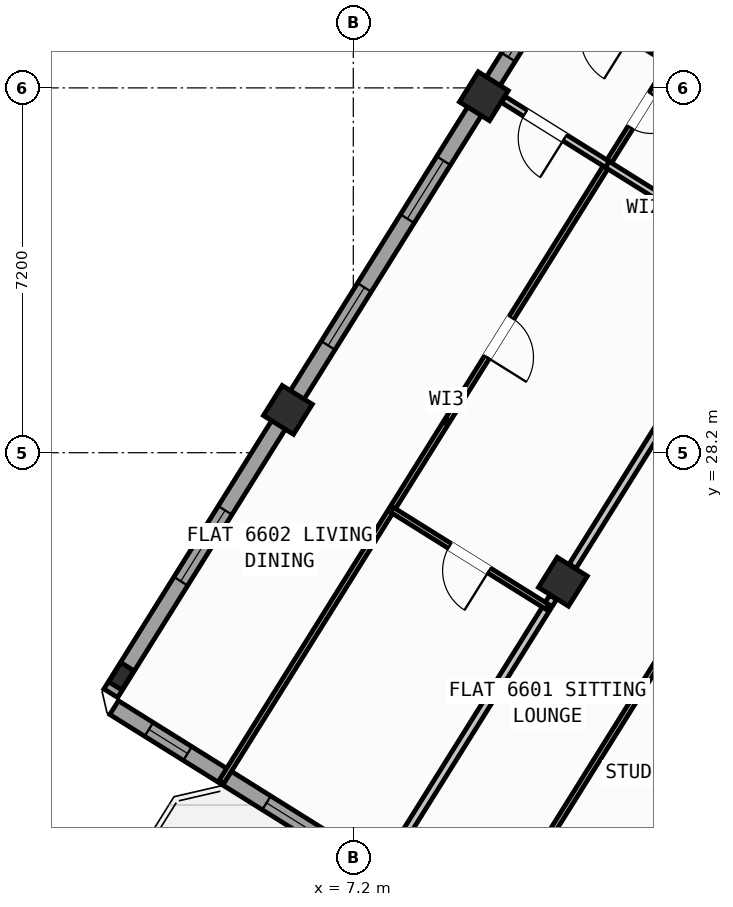
"""IFC4 building model, lengths in metres.
Left out: names, types, materials, properties, quantities, classifications, styles, units other than length and angle.
Written with IfcOpenShell. Run it as: python <this file> out.ifc"""

import sys

from ifc_helpers import new_model, si_unit, direction, frame, frame_2d, origin, origin_2d, place, context, subcontext, project, spatial, rectangle, hollow_rectangle, i_section, extrude, source, transform, mapped, element, fill, save


model = new_model("IFC4")
c1 = context("Model", 3, precision=1e-05, world=origin(), true_north=direction((0.0, 1.0)))
c2 = subcontext(c1, "Body", "Model", "MODEL_VIEW")
j1 = project(units=[si_unit("LENGTHUNIT", "METRE"), si_unit("PLANEANGLEUNIT", "RADIAN")], contexts=[c1])
p1 = place(None, origin())
s1 = spatial("IfcSite", under=j1, at=p1, CompositionType="ELEMENT")
p2 = place(p1, origin())
s2 = spatial("IfcBuilding", under=s1, at=p2, CompositionType="ELEMENT")
p3 = place(p2, frame((0.0, 0.0, 262.8)))
s3 = spatial("IfcBuildingStorey", under=s2, at=p3, CompositionType="ELEMENT", Elevation=262.8)
m1 = source(origin(), c2, "Body", "SweptSolid", [
    extrude(hollow_rectangle(XDim=0.7, YDim=0.7, WallThickness=0.028, at=origin_2d()), origin(), (0.0, 0.0, 1.0), 3.6),
])
for number, where, z_axis, x_axis in (
    (1, (11.336, 25.653, 0.0), (0.0, 0.0, 1.0), (-0.848, 0.53, 0.0)),
    (2, (9.777, 35.235, 0.0), (0.0, 0.0, 1.0), (-0.848, 0.53, 0.0)),
    (3, (5.909, 29.044, 0.0), (0.0, 0.0, 1.0), (-0.848, 0.53, 0.0)),
):
    element("IfcColumn", number, at=place(p3, frame(where, z_axis=z_axis, x_axis=x_axis)), inside=s3, PredefinedType="COLUMN", context=c2, shape_type="MappedRepresentation", body=[
        mapped(m1, transform((0.0, 0.0, 0.0), scale=1.0)),
    ])
m2 = source(origin(), c2, "Body", "SweptSolid", [
    extrude(i_section(OverallWidth=0.3, OverallDepth=0.45, WebThickness=0.014, FlangeThickness=0.026, at=origin_2d()), origin(), (0.0, 0.0, 1.0), 3.6),
])
p4 = place(p3, frame((2.623, 23.786, 0.0), z_axis=(0.0, 0.0, 1.0), x_axis=(-0.848048096156, 0.529919264233, 0.0)))
e4 = element("IfcColumn", 4, at=p4, inside=s3, PredefinedType="COLUMN", context=c2, shape_type="MappedRepresentation", body=[
    mapped(m2, transform((0.0, 0.0, 0.0), scale=1.0)),
])
p5 = place(p3, frame((29.268, 6.429, 0.0), z_axis=(0.0, 0.0, 1.0), x_axis=(-0.848049971435, 0.529916263149, 0.0)))
e5 = element("IfcWall", 5, at=p5, inside=s3, PredefinedType="STANDARD", context=c2, shape_type="SweptSolid", body=[
    extrude(rectangle(XDim=31.588, YDim=0.32, at=frame_2d((15.794, 0.0))), origin(), (0.0, 0.0, 1.0), 3.35),
])
p6 = place(p5, frame((16.362, 0.0, 0.0)))
e6 = element("IfcOpeningElement", 6, at=p6, cuts=e5, PredefinedType="OPENING", context=c2, shape_type="SweptSolid", body=[
    extrude(rectangle(XDim=1.2, YDim=2.15, at=frame_2d((0.6, 1.075))), frame((0.0, 0.17, 0.0), z_axis=(0.0, -1.0, 0.0), x_axis=(1.0, 0.0, 0.0)), (0.0, 0.0, 1.0), 0.34),
])
p7 = place(p5, frame((3.859, 0.0, 0.9)))
e7 = element("IfcOpeningElement", 7, at=p7, cuts=e5, PredefinedType="OPENING", context=c2, shape_type="SweptSolid", body=[
    extrude(rectangle(XDim=1.65, YDim=1.45, at=frame_2d((0.825, 0.725))), frame((0.0, 0.17, 0.0), z_axis=(0.0, -1.0, 0.0), x_axis=(1.0, 0.0, 0.0)), (0.0, 0.0, 1.0), 0.34),
])
p8 = place(p5, frame((10.519, 0.0, 0.9)))
e8 = element("IfcOpeningElement", 8, at=p8, cuts=e5, PredefinedType="OPENING", context=c2, shape_type="SweptSolid", body=[
    extrude(rectangle(XDim=1.65, YDim=1.45, at=frame_2d((0.825, 0.725))), frame((0.0, 0.17, 0.0), z_axis=(0.0, -1.0, 0.0), x_axis=(1.0, 0.0, 0.0)), (0.0, 0.0, 1.0), 0.34),
])
p9 = place(p5, frame((20.015, 0.0, 0.95)))
e9 = element("IfcOpeningElement", 9, at=p9, cuts=e5, PredefinedType="OPENING", context=c2, shape_type="SweptSolid", body=[
    extrude(rectangle(XDim=1.95, YDim=1.35, at=frame_2d((0.975, 0.675))), frame((0.0, 0.17, 0.0), z_axis=(0.0, -1.0, 0.0), x_axis=(1.0, 0.0, 0.0)), (0.0, 0.0, 1.0), 0.34),
])
p10 = place(p5, frame((23.715, 0.0, 1.0)))
e10 = element("IfcOpeningElement", 10, at=p10, cuts=e5, PredefinedType="OPENING", context=c2, shape_type="SweptSolid", body=[
    extrude(rectangle(XDim=0.9, YDim=1.25, at=frame_2d((0.45, 0.625))), frame((0.0, 0.17, 0.0), z_axis=(0.0, -1.0, 0.0), x_axis=(1.0, 0.0, 0.0)), (0.0, 0.0, 1.0), 0.34),
])
p11 = place(p5, frame((26.391, 0.0, 0.9)))
e11 = element("IfcOpeningElement", 11, at=p11, cuts=e5, PredefinedType="OPENING", context=c2, shape_type="SweptSolid", body=[
    extrude(rectangle(XDim=1.65, YDim=1.45, at=frame_2d((0.825, 0.725))), frame((0.0, 0.17, 0.0), z_axis=(0.0, -1.0, 0.0), x_axis=(1.0, 0.0, 0.0)), (0.0, 0.0, 1.0), 0.34),
])
p12 = place(p5, frame((29.878, 0.0, 1.0)))
e12 = element("IfcOpeningElement", 12, at=p12, cuts=e5, PredefinedType="OPENING", context=c2, shape_type="SweptSolid", body=[
    extrude(rectangle(XDim=0.9, YDim=1.25, at=frame_2d((0.45, 0.625))), frame((0.0, 0.17, 0.0), z_axis=(0.0, -1.0, 0.0), x_axis=(1.0, 0.0, 0.0)), (0.0, 0.0, 1.0), 0.34),
])
p13 = place(p3, frame((2.415, 23.452, 0.0), z_axis=(0.0, 0.0, 1.0), x_axis=(0.52991049553, 0.848053575387, 0.0)))
e13 = element("IfcWall", 13, at=p13, inside=s3, PredefinedType="STANDARD", context=c2, shape_type="SweptSolid", body=[
    extrude(rectangle(XDim=21.587, YDim=0.32, at=frame_2d((10.794, 0.0))), origin(), (0.0, 0.0, 1.0), 2.875),
])
p14 = place(p13, frame((2.606, 0.0, 0.9)))
e14 = element("IfcOpeningElement", 14, at=p14, cuts=e13, PredefinedType="OPENING", context=c2, shape_type="SweptSolid", body=[
    extrude(rectangle(XDim=1.65, YDim=1.45, at=frame_2d((0.825, 0.725))), frame((0.0, 0.17, 0.0), z_axis=(0.0, -1.0, 0.0), x_axis=(1.0, 0.0, 0.0)), (0.0, 0.0, 1.0), 0.34),
])
p15 = place(p13, frame((8.094, 0.0, 0.9)))
e15 = element("IfcOpeningElement", 15, at=p15, cuts=e13, PredefinedType="OPENING", context=c2, shape_type="SweptSolid", body=[
    extrude(rectangle(XDim=1.35, YDim=1.45, at=frame_2d((0.675, 0.725))), frame((0.0, 0.17, 0.0), z_axis=(0.0, -1.0, 0.0), x_axis=(1.0, 0.0, 0.0)), (0.0, 0.0, 1.0), 0.34),
])
p16 = place(p13, frame((11.044, 0.0, 0.9)))
e16 = element("IfcOpeningElement", 16, at=p16, cuts=e13, PredefinedType="OPENING", context=c2, shape_type="SweptSolid", body=[
    extrude(rectangle(XDim=1.35, YDim=1.45, at=frame_2d((0.675, 0.725))), frame((0.0, 0.17, 0.0), z_axis=(0.0, -1.0, 0.0), x_axis=(1.0, 0.0, 0.0)), (0.0, 0.0, 1.0), 0.34),
])
p17 = place(p13, frame((14.804, 0.0, 1.0)))
e17 = element("IfcOpeningElement", 17, at=p17, cuts=e13, PredefinedType="OPENING", context=c2, shape_type="SweptSolid", body=[
    extrude(rectangle(XDim=0.9, YDim=1.25, at=frame_2d((0.45, 0.625))), frame((0.0, 0.17, 0.0), z_axis=(0.0, -1.0, 0.0), x_axis=(1.0, 0.0, 0.0)), (0.0, 0.0, 1.0), 0.34),
])
p18 = place(p13, frame((19.384, 0.0, 1.0)))
e18 = element("IfcOpeningElement", 18, at=p18, cuts=e13, PredefinedType="OPENING", context=c2, shape_type="SweptSolid", body=[
    extrude(rectangle(XDim=0.9, YDim=1.25, at=frame_2d((0.45, 0.625))), frame((0.0, 0.17, 0.0), z_axis=(0.0, -1.0, 0.0), x_axis=(1.0, 0.0, 0.0)), (0.0, 0.0, 1.0), 0.34),
])
p19 = place(p3, frame((26.363, 30.472, 0.0), z_axis=(0.0, 0.0, 1.0), x_axis=(-0.848052408131, 0.529912363569, 0.0)))
e19 = element("IfcWall", 19, at=p19, inside=s3, PredefinedType="PARTITIONING", context=c2, shape_type="SweptSolid", body=[
    extrude(rectangle(XDim=16.73, YDim=0.16, at=frame_2d((8.365, 0.0))), origin(), (0.0, 0.0, 1.0), 3.34),
])
p20 = place(p19, frame((1.588, 0.0, 0.0)))
e20 = element("IfcOpeningElement", 20, at=p20, cuts=e19, PredefinedType="OPENING", context=c2, shape_type="SweptSolid", body=[
    extrude(rectangle(XDim=1.0, YDim=2.1, at=frame_2d((0.5, 1.05))), frame((0.0, 0.09, 0.0), z_axis=(0.0, -1.0, 0.0), x_axis=(1.0, 0.0, 0.0)), (0.0, 0.0, 1.0), 0.18),
])
p21 = place(p19, frame((6.685, 0.0, 0.0)))
e21 = element("IfcOpeningElement", 21, at=p21, cuts=e19, PredefinedType="OPENING", context=c2, shape_type="SweptSolid", body=[
    extrude(rectangle(XDim=1.0, YDim=2.1, at=frame_2d((0.5, 1.05))), frame((0.0, 0.09, 0.0), z_axis=(0.0, -1.0, 0.0), x_axis=(1.0, 0.0, 0.0)), (0.0, 0.0, 1.0), 0.18),
])
p22 = place(p19, frame((12.951, 0.0, 0.0)))
e22 = element("IfcOpeningElement", 22, at=p22, cuts=e19, PredefinedType="OPENING", context=c2, shape_type="SweptSolid", body=[
    extrude(rectangle(XDim=1.0, YDim=2.1, at=frame_2d((0.5, 1.05))), frame((0.0, 0.09, 0.0), z_axis=(0.0, -1.0, 0.0), x_axis=(1.0, 0.0, 0.0)), (0.0, 0.0, 1.0), 0.18),
])
p23 = place(p3, frame((25.198, 28.606, 0.0), z_axis=(0.0, 0.0, 1.0), x_axis=(-0.848052408131, 0.529912363569, 0.0)))
e23 = element("IfcWall", 23, at=p23, inside=s3, PredefinedType="PARTITIONING", context=c2, shape_type="SweptSolid", body=[
    extrude(rectangle(XDim=16.73, YDim=0.16, at=frame_2d((8.365, 0.0))), origin(), (0.0, 0.0, 1.0), 3.34),
])
p24 = place(p23, frame((1.395, 0.0, 0.0)))
e24 = element("IfcOpeningElement", 24, at=p24, cuts=e23, PredefinedType="OPENING", context=c2, shape_type="SweptSolid", body=[
    extrude(rectangle(XDim=1.0, YDim=2.1, at=frame_2d((0.5, 1.05))), frame((0.0, 0.09, 0.0), z_axis=(0.0, -1.0, 0.0), x_axis=(1.0, 0.0, 0.0)), (0.0, 0.0, 1.0), 0.18),
])
p25 = place(p23, frame((7.82, 0.0, 0.0)))
e25 = element("IfcOpeningElement", 25, at=p25, cuts=e23, PredefinedType="OPENING", context=c2, shape_type="SweptSolid", body=[
    extrude(rectangle(XDim=1.0, YDim=2.1, at=frame_2d((0.5, 1.05))), frame((0.0, 0.09, 0.0), z_axis=(0.0, -1.0, 0.0), x_axis=(1.0, 0.0, 0.0)), (0.0, 0.0, 1.0), 0.18),
])
p26 = place(p23, frame((14.76, 0.0, 0.0)))
e26 = element("IfcOpeningElement", 26, at=p26, cuts=e23, PredefinedType="OPENING", context=c2, shape_type="SweptSolid", body=[
    extrude(rectangle(XDim=1.0, YDim=2.1, at=frame_2d((0.5, 1.05))), frame((0.0, 0.09, 0.0), z_axis=(0.0, -1.0, 0.0), x_axis=(1.0, 0.0, 0.0)), (0.0, 0.0, 1.0), 0.18),
])
p27 = place(p3, frame((15.013, 31.537, 0.0), z_axis=(0.0, 0.0, 1.0), x_axis=(-0.529922185033, -0.848046271031, 0.0)))
e27 = element("IfcWall", 27, at=p27, inside=s3, PredefinedType="PARTITIONING", context=c2, shape_type="SweptSolid", body=[
    extrude(rectangle(XDim=6.576, YDim=0.16, at=frame_2d((3.288, 0.0))), origin(), (0.0, 0.0, 1.0), 2.875),
])
p28 = place(p3, frame((11.144, 25.346, 0.0), z_axis=(0.0, 0.0, 1.0), x_axis=(-0.529904903214, -0.848057069748, 0.0)))
e28 = element("IfcWall", 28, at=p28, inside=s3, PredefinedType="PARTITIONING", context=c2, shape_type="SweptSolid", body=[
    extrude(rectangle(XDim=5.601, YDim=0.16, at=frame_2d((2.801, 0.0))), origin(), (0.0, 0.0, 1.0), 2.875),
])
p29 = place(p3, frame((16.191, 28.833, 0.0), z_axis=(0.0, 0.0, 1.0), x_axis=(-0.529921526101, -0.84804668278, 0.0)))
e29 = element("IfcWall", 29, at=p29, inside=s3, PredefinedType="PARTITIONING", context=c2, shape_type="SweptSolid", body=[
    extrude(rectangle(XDim=12.19, YDim=0.11, at=frame_2d((6.095, 0.0))), origin(), (0.0, 0.0, 1.0), 3.34),
])
p30 = place(p29, frame((0.35, 0.0, 0.0)))
e30 = element("IfcOpeningElement", 30, at=p30, cuts=e29, PredefinedType="OPENING", context=c2, shape_type="SweptSolid", body=[
    extrude(rectangle(XDim=0.92, YDim=2.08, at=frame_2d((0.46, 1.04))), frame((0.0, 0.065, 0.0), z_axis=(0.0, -1.0, 0.0), x_axis=(1.0, 0.0, 0.0)), (0.0, 0.0, 1.0), 0.13),
])
p31 = place(p3, frame((13.486, 35.924, 0.0), z_axis=(0.0, 0.0, 1.0), x_axis=(-0.529920421309, -0.848047373134, 0.0)))
e31 = element("IfcWall", 31, at=p31, inside=s3, PredefinedType="PARTITIONING", context=c2, shape_type="SweptSolid", body=[
    extrude(rectangle(XDim=16.77, YDim=0.11, at=frame_2d((8.385, 0.0))), origin(), (0.0, 0.0, 1.0), 3.34),
])
p32 = place(p31, frame((0.76, 0.0, 0.0)))
e32 = element("IfcOpeningElement", 32, at=p32, cuts=e31, PredefinedType="OPENING", context=c2, shape_type="SweptSolid", body=[
    extrude(rectangle(XDim=0.78, YDim=2.05, at=frame_2d((0.39, 1.025))), frame((0.0, 0.065, 0.0), z_axis=(0.0, -1.0, 0.0), x_axis=(1.0, 0.0, 0.0)), (0.0, 0.0, 1.0), 0.13),
])
p33 = place(p31, frame((5.967, 0.0, 0.0)))
e33 = element("IfcOpeningElement", 33, at=p33, cuts=e31, PredefinedType="OPENING", context=c2, shape_type="SweptSolid", body=[
    extrude(rectangle(XDim=0.92, YDim=2.08, at=frame_2d((0.46, 1.04))), frame((0.0, 0.065, 0.0), z_axis=(0.0, -1.0, 0.0), x_axis=(1.0, 0.0, 0.0)), (0.0, 0.0, 1.0), 0.13),
])
p34 = place(p3, frame((12.214, 33.889, 0.0), z_axis=(0.0, 0.0, 1.0), x_axis=(-0.848060696325, 0.529899099216, 0.0)))
e34 = element("IfcWall", 34, at=p34, inside=s3, PredefinedType="PLUMBINGWALL", context=c2, shape_type="SweptSolid", body=[
    extrude(rectangle(XDim=2.418, YDim=0.14, at=frame_2d((1.209, 0.0))), origin(), (0.0, 0.0, 1.0), 2.875),
])
p35 = place(p34, frame((0.99, 0.0, 0.0)))
e35 = element("IfcOpeningElement", 35, at=p35, cuts=e34, PredefinedType="OPENING", context=c2, shape_type="SweptSolid", body=[
    extrude(rectangle(XDim=0.92, YDim=2.08, at=frame_2d((0.46, 1.04))), frame((0.0, 0.08, 0.0), z_axis=(0.0, -1.0, 0.0), x_axis=(1.0, 0.0, 0.0)), (0.0, 0.0, 1.0), 0.16),
])
p36 = place(p3, frame((14.977, 32.163, 0.0), z_axis=(0.0, 0.0, 1.0), x_axis=(-0.848036190178, 0.529938317305, 0.0)))
e36 = element("IfcWall", 36, at=p36, inside=s3, PredefinedType="PLUMBINGWALL", context=c2, shape_type="SweptSolid", body=[
    extrude(rectangle(XDim=3.258, YDim=0.14, at=frame_2d((1.629, 0.0))), origin(), (0.0, 0.0, 1.0), 2.875),
])
p37 = place(p3, frame((11.027, 25.158, 0.0), z_axis=(0.0, 0.0, 1.0), x_axis=(-0.848051346257, 0.52991406295, 0.0)))
e37 = element("IfcWall", 37, at=p37, inside=s3, PredefinedType="PARTITIONING", context=c2, shape_type="SweptSolid", body=[
    extrude(rectangle(XDim=3.62, YDim=0.11, at=frame_2d((1.81, 0.0))), origin(), (0.0, 0.0, 1.0), 3.34),
])
p38 = place(p37, frame((1.35, 0.0, 0.0)))
e38 = element("IfcOpeningElement", 38, at=p38, cuts=e37, PredefinedType="OPENING", context=c2, shape_type="SweptSolid", body=[
    extrude(rectangle(XDim=0.92, YDim=2.08, at=frame_2d((0.46, 1.04))), frame((0.0, 0.065, 0.0), z_axis=(0.0, -1.0, 0.0), x_axis=(1.0, 0.0, 0.0)), (0.0, 0.0, 1.0), 0.13),
])
m3 = source(origin(), c2, "Body", "SweptSolid", [
    extrude(rectangle(XDim=1.65, YDim=1.45, at=frame_2d((0.825, 0.725))), frame((0.0, 0.03, 0.0), z_axis=(0.0, -1.0, 0.0), x_axis=(1.0, 0.0, 0.0)), (0.0, 0.0, 1.0), 0.06),
])
p39 = place(p11, origin())
e39 = element("IfcWindow", 39, at=p39, inside=s3, PartitioningType="SINGLE_PANEL", PredefinedType="WINDOW", context=c2, shape_type="MappedRepresentation", body=[
    mapped(m3, transform((0.0, 0.0, 0.0), scale=1.0)),
])
fill(e11, e39)
m4 = source(origin(), c2, "Body", "SweptSolid", [
    extrude(rectangle(XDim=0.9, YDim=1.25, at=frame_2d((0.45, 0.625))), frame((0.0, 0.03, 0.0), z_axis=(0.0, -1.0, 0.0), x_axis=(1.0, 0.0, 0.0)), (0.0, 0.0, 1.0), 0.06),
])
p40 = place(p12, origin())
e40 = element("IfcWindow", 40, at=p40, inside=s3, PartitioningType="SINGLE_PANEL", PredefinedType="WINDOW", context=c2, shape_type="MappedRepresentation", body=[
    mapped(m4, transform((0.0, 0.0, 0.0), scale=1.0)),
])
fill(e12, e40)
p41 = place(p14, origin())
e41 = element("IfcWindow", 41, at=p41, inside=s3, PartitioningType="SINGLE_PANEL", PredefinedType="WINDOW", context=c2, shape_type="MappedRepresentation", body=[
    mapped(m3, transform((0.0, 0.0, 0.0), scale=1.0)),
])
fill(e14, e41)
m5 = source(origin(), c2, "Body", "SweptSolid", [
    extrude(rectangle(XDim=1.35, YDim=1.45, at=frame_2d((0.675, 0.725))), frame((0.0, 0.03, 0.0), z_axis=(0.0, -1.0, 0.0), x_axis=(1.0, 0.0, 0.0)), (0.0, 0.0, 1.0), 0.06),
])
p42 = place(p15, origin())
e42 = element("IfcWindow", 42, at=p42, inside=s3, PartitioningType="SINGLE_PANEL", PredefinedType="WINDOW", context=c2, shape_type="MappedRepresentation", body=[
    mapped(m5, transform((0.0, 0.0, 0.0), scale=1.0)),
])
fill(e15, e42)
p43 = place(p16, origin())
e43 = element("IfcWindow", 43, at=p43, inside=s3, PartitioningType="SINGLE_PANEL", PredefinedType="WINDOW", context=c2, shape_type="MappedRepresentation", body=[
    mapped(m5, transform((0.0, 0.0, 0.0), scale=1.0)),
])
fill(e16, e43)
p44 = place(p17, origin())
e44 = element("IfcWindow", 44, at=p44, inside=s3, PartitioningType="SINGLE_PANEL", PredefinedType="WINDOW", context=c2, shape_type="MappedRepresentation", body=[
    mapped(m4, transform((0.0, 0.0, 0.0), scale=1.0)),
])
fill(e17, e44)
m6 = source(origin(), c2, "Body", "SweptSolid", [
    extrude(rectangle(XDim=0.92, YDim=2.08, at=frame_2d((0.46, 1.04))), frame((0.0, 0.025, 0.0), z_axis=(0.0, -1.0, 0.0), x_axis=(1.0, 0.0, 0.0)), (0.0, 0.0, 1.0), 0.05),
])
p45 = place(p35, origin())
e45 = element("IfcDoor", 45, at=p45, inside=s3, OperationType="SINGLE_SWING_LEFT", PredefinedType="DOOR", context=c2, shape_type="MappedRepresentation", body=[
    mapped(m6, transform((0.0, 0.0, 0.0), scale=1.0)),
])
fill(e35, e45)
m7 = source(origin(), c2, "Body", "SweptSolid", [
    extrude(rectangle(XDim=0.78, YDim=2.05, at=frame_2d((0.39, 1.025))), frame((0.0, 0.025, 0.0), z_axis=(0.0, -1.0, 0.0), x_axis=(1.0, 0.0, 0.0)), (0.0, 0.0, 1.0), 0.05),
])
p46 = place(p32, origin())
e46 = element("IfcDoor", 46, at=p46, inside=s3, OperationType="SINGLE_SWING_LEFT", PredefinedType="DOOR", context=c2, shape_type="MappedRepresentation", body=[
    mapped(m7, transform((0.0, 0.0, 0.0), scale=1.0)),
])
fill(e32, e46)
p47 = place(p33, origin())
e47 = element("IfcDoor", 47, at=p47, inside=s3, OperationType="SINGLE_SWING_RIGHT", PredefinedType="DOOR", context=c2, shape_type="MappedRepresentation", body=[
    mapped(m6, transform((0.0, 0.0, 0.0), scale=1.0)),
])
fill(e33, e47)
p48 = place(p38, origin())
e48 = element("IfcDoor", 48, at=p48, inside=s3, OperationType="SINGLE_SWING_LEFT", PredefinedType="DOOR", context=c2, shape_type="MappedRepresentation", body=[
    mapped(m6, transform((0.0, 0.0, 0.0), scale=1.0)),
])
fill(e38, e48)
save(model, sys.argv[1])
